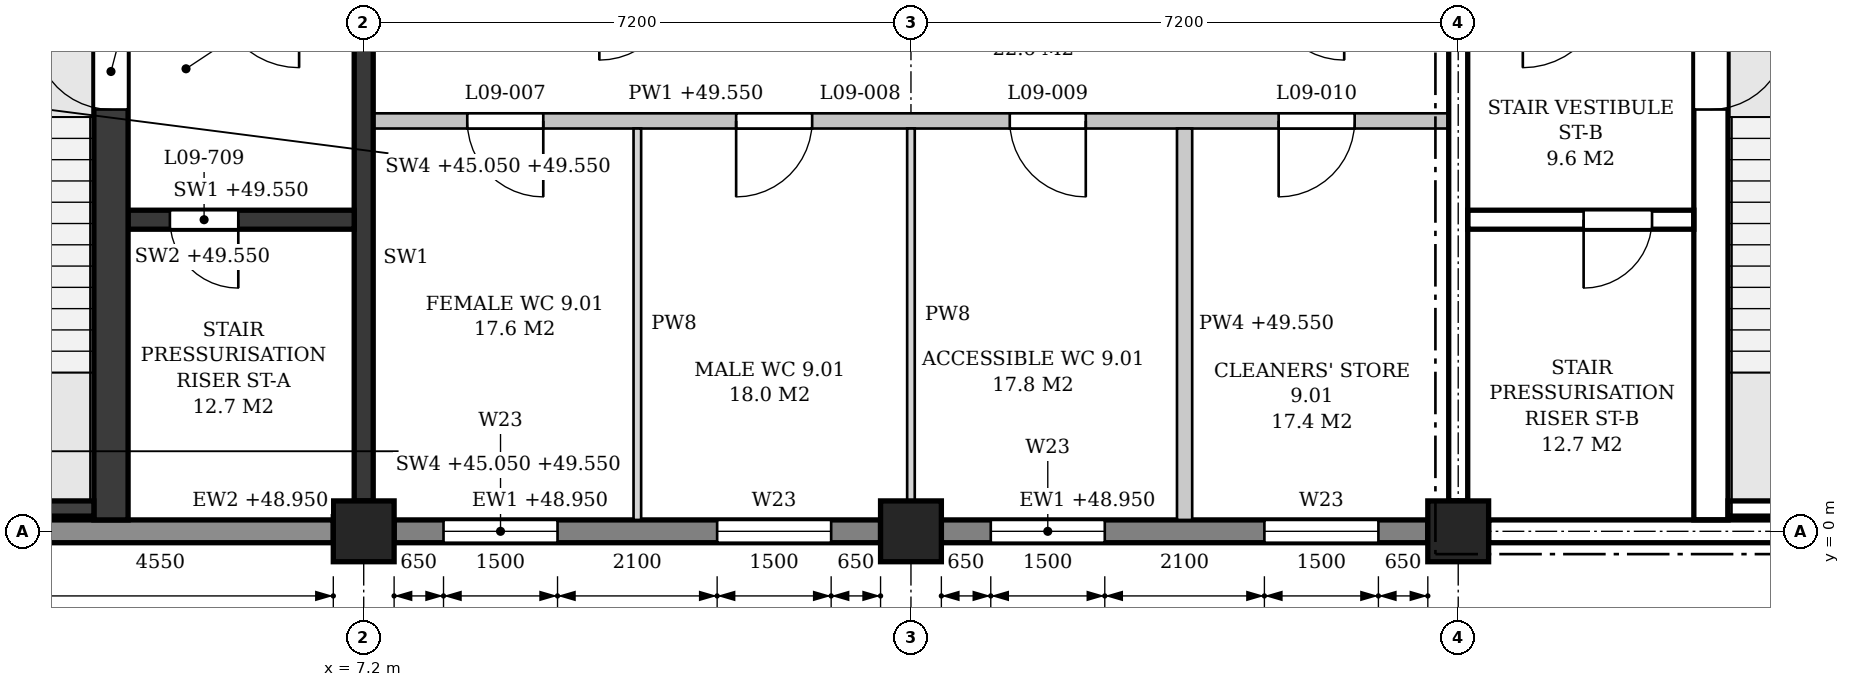
"""IFC4 building model, lengths in metres.
Left out: names, types, materials, properties, quantities, classifications, styles, units other than length and angle.
Written with IfcOpenShell. Run it as: python <this file> out.ifc"""

import sys

from ifc_helpers import new_model, si_unit, direction, frame, frame_2d, origin, origin_2d, place, context, subcontext, project, spatial, polyline, rectangle, outline, extrude, element, fill, save


model = new_model("IFC4")
c1 = context("Model", 3, precision=1e-05, world=origin(), true_north=direction((0.0, 1.0)))
c2 = subcontext(c1, "Body", "Model", "MODEL_VIEW")
j1 = project(units=[si_unit("LENGTHUNIT", "METRE"), si_unit("PLANEANGLEUNIT", "RADIAN")], contexts=[c1])
p1 = place(None, origin())
s1 = spatial("IfcSite", under=j1, at=p1, CompositionType="ELEMENT")
p2 = place(p1, origin())
s2 = spatial("IfcBuilding", under=s1, at=p2, CompositionType="ELEMENT")
p3 = place(p2, frame((0.0, 0.0, 45.3)))
s3 = spatial("IfcBuildingStorey", under=s2, at=p3, CompositionType="ELEMENT", Elevation=45.3)
for number, where, z_axis, x_axis in (
    (1, (7.2, 0.0, 0.0), (0.0, 0.0, 1.0), (1.0, 0.0, 0.0)),
    (2, (14.4, 0.0, 0.0), (0.0, 0.0, 1.0), (1.0, 0.0, 0.0)),
    (3, (21.6, 0.0, 0.0), (0.0, 0.0, 1.0), (1.0, 0.0, 0.0)),
):
    element("IfcColumn", number, at=place(p3, frame(where, z_axis=z_axis, x_axis=x_axis)), inside=s3, PredefinedType="COLUMN", context=c2, shape_type="SweptSolid", body=[
        extrude(rectangle(XDim=0.8, YDim=0.8, at=origin_2d()), origin(), (0.0, 0.0, 1.0), 4.5),
    ])
p4 = place(p3, frame((0.4, 0.0, 0.0), z_axis=(0.0, 0.0, 1.0), x_axis=(1.0, 0.0, 0.0)))
e4 = element("IfcWall", 4, at=p4, inside=s3, PredefinedType="STANDARD", context=c2, shape_type="SweptSolid", body=[
    extrude(rectangle(XDim=6.4, YDim=0.3, at=frame_2d((3.2, 0.0))), origin(), (0.0, 0.0, 1.0), 3.65),
])
p5 = place(p4, frame((0.95, 0.0, 0.9)))
e5 = element("IfcOpeningElement", 5, at=p5, cuts=e4, PredefinedType="OPENING", context=c2, shape_type="SweptSolid", body=[
    extrude(outline(polyline([(0.0, 0.0), (0.9, 0.0), (0.9, 2.25), (0.45, 2.7), (0.0, 2.25), (0.0, 0.0)])), frame((0.0, 0.16, 0.0), z_axis=(0.0, -1.0, 0.0), x_axis=(1.0, 0.0, 0.0)), (0.0, 0.0, 1.0), 0.32),
])
p6 = place(p3, frame((7.6, 0.0, 0.0), z_axis=(0.0, 0.0, 1.0), x_axis=(1.0, 0.0, 0.0)))
e6 = element("IfcWall", 6, at=p6, inside=s3, PredefinedType="STANDARD", context=c2, shape_type="SweptSolid", body=[
    extrude(rectangle(XDim=6.4, YDim=0.3, at=frame_2d((3.2, 0.0))), origin(), (0.0, 0.0, 1.0), 3.65),
])
p7 = place(p6, frame((0.65, 0.0, 0.9)))
e7 = element("IfcOpeningElement", 7, at=p7, cuts=e6, PredefinedType="OPENING", context=c2, shape_type="SweptSolid", body=[
    extrude(outline(polyline([(0.0, 0.0), (1.5, 0.0), (1.5, 1.95), (0.75, 2.7), (0.0, 1.95), (0.0, 0.0)])), frame((0.0, 0.16, 0.0), z_axis=(0.0, -1.0, 0.0), x_axis=(1.0, 0.0, 0.0)), (0.0, 0.0, 1.0), 0.32),
])
p8 = place(p6, frame((4.25, 0.0, 0.9)))
e8 = element("IfcOpeningElement", 8, at=p8, cuts=e6, PredefinedType="OPENING", context=c2, shape_type="SweptSolid", body=[
    extrude(outline(polyline([(0.0, 0.0), (1.5, 0.0), (1.5, 1.95), (0.75, 2.7), (0.0, 1.95), (0.0, 0.0)])), frame((0.0, 0.16, 0.0), z_axis=(0.0, -1.0, 0.0), x_axis=(1.0, 0.0, 0.0)), (0.0, 0.0, 1.0), 0.32),
])
p9 = place(p3, frame((14.8, 0.0, 0.0), z_axis=(0.0, 0.0, 1.0), x_axis=(1.0, 0.0, 0.0)))
e9 = element("IfcWall", 9, at=p9, inside=s3, PredefinedType="STANDARD", context=c2, shape_type="SweptSolid", body=[
    extrude(rectangle(XDim=6.4, YDim=0.3, at=frame_2d((3.2, 0.0))), origin(), (0.0, 0.0, 1.0), 3.65),
])
p10 = place(p9, frame((0.65, 0.0, 0.9)))
e10 = element("IfcOpeningElement", 10, at=p10, cuts=e9, PredefinedType="OPENING", context=c2, shape_type="SweptSolid", body=[
    extrude(outline(polyline([(0.0, 0.0), (1.5, 0.0), (1.5, 1.95), (0.75, 2.7), (0.0, 1.95), (0.0, 0.0)])), frame((0.0, 0.16, 0.0), z_axis=(0.0, -1.0, 0.0), x_axis=(1.0, 0.0, 0.0)), (0.0, 0.0, 1.0), 0.32),
])
p11 = place(p9, frame((4.25, 0.0, 0.9)))
e11 = element("IfcOpeningElement", 11, at=p11, cuts=e9, PredefinedType="OPENING", context=c2, shape_type="SweptSolid", body=[
    extrude(outline(polyline([(0.0, 0.0), (1.5, 0.0), (1.5, 1.95), (0.75, 2.7), (0.0, 1.95), (0.0, 0.0)])), frame((0.0, 0.16, 0.0), z_axis=(0.0, -1.0, 0.0), x_axis=(1.0, 0.0, 0.0)), (0.0, 0.0, 1.0), 0.32),
])
p12 = place(p3, frame((22.0, 0.0, 0.0), z_axis=(0.0, 0.0, 1.0), x_axis=(1.0, 0.0, 0.0)))
e12 = element("IfcWall", 12, at=p12, inside=s3, PredefinedType="STANDARD", context=c2, shape_type="SweptSolid", body=[
    extrude(rectangle(XDim=6.4, YDim=0.3, at=frame_2d((3.2, 0.0))), origin(), (0.0, 0.0, 1.0), 3.65),
])
p13 = place(p12, frame((4.55, 0.0, 0.9)))
e13 = element("IfcOpeningElement", 13, at=p13, cuts=e12, PredefinedType="OPENING", context=c2, shape_type="SweptSolid", body=[
    extrude(outline(polyline([(0.0, 0.0), (0.9, 0.0), (0.9, 2.25), (0.45, 2.7), (0.0, 2.25), (0.0, 0.0)])), frame((0.0, 0.16, 0.0), z_axis=(0.0, -1.0, 0.0), x_axis=(1.0, 0.0, 0.0)), (0.0, 0.0, 1.0), 0.32),
])
p14 = place(p3, frame((7.2, 0.4, 0.0), z_axis=(0.0, 0.0, 1.0), x_axis=(0.0, 1.0, 0.0)))
e14 = element("IfcWall", 14, at=p14, inside=s3, PredefinedType="SHEAR", context=c2, shape_type="SweptSolid", body=[
    extrude(rectangle(XDim=6.4, YDim=0.25, at=frame_2d((3.2, 0.0))), origin(), (0.0, 0.0, 1.0), 3.55),
])
p15 = place(p3, frame((2.25, 0.3, -0.25), z_axis=(0.0, 0.0, 1.0), x_axis=(1.0, 0.0, 0.0)))
e15 = element("IfcWall", 15, at=p15, inside=s3, PredefinedType="SHEAR", context=c2, shape_type="SweptSolid", body=[
    extrude(rectangle(XDim=1.4, YDim=0.2, at=frame_2d((0.7, 0.0))), origin(), (0.0, 0.0, 1.0), 4.5),
])
p16 = place(p3, frame((3.875, 0.15, 0.0), z_axis=(0.0, 0.0, 1.0), x_axis=(0.0, 1.0, 0.0)))
e16 = element("IfcWall", 16, at=p16, inside=s3, PredefinedType="SHEAR", context=c2, shape_type="SweptSolid", body=[
    extrude(rectangle(XDim=6.925, YDim=0.45, at=frame_2d((3.462, 0.0))), origin(), (0.0, 0.0, 1.0), 4.25),
])
p17 = place(p16, frame((5.4, 0.0, 0.0)))
e17 = element("IfcOpeningElement", 17, at=p17, cuts=e16, PredefinedType="OPENING", context=c2, shape_type="SweptSolid", body=[
    extrude(rectangle(XDim=1.0, YDim=2.1, at=frame_2d((0.5, 1.05))), frame((0.0, 0.235, 0.0), z_axis=(0.0, -1.0, 0.0), x_axis=(1.0, 0.0, 0.0)), (0.0, 0.0, 1.0), 0.47),
])
p18 = place(p3, frame((4.1, 4.1, 0.0), z_axis=(0.0, 0.0, 1.0), x_axis=(1.0, 0.0, 0.0)))
e18 = element("IfcWall", 18, at=p18, inside=s3, PredefinedType="SHEAR", context=c2, shape_type="SweptSolid", body=[
    extrude(rectangle(XDim=2.975, YDim=0.25, at=frame_2d((1.487, 0.0))), origin(), (0.0, 0.0, 1.0), 4.25),
])
p19 = place(p18, frame((0.55, 0.0, 0.0)))
e19 = element("IfcOpeningElement", 19, at=p19, cuts=e18, PredefinedType="OPENING", context=c2, shape_type="SweptSolid", body=[
    extrude(rectangle(XDim=0.9, YDim=2.1, at=frame_2d((0.45, 1.05))), frame((0.0, 0.135, 0.0), z_axis=(0.0, -1.0, 0.0), x_axis=(1.0, 0.0, 0.0)), (0.0, 0.0, 1.0), 0.27),
])
p20 = place(p3, frame((21.6, 0.4, 0.0), z_axis=(0.0, 0.0, 1.0), x_axis=(0.0, 1.0, 0.0)))
e20 = element("IfcWall", 20, at=p20, inside=s3, PredefinedType="SHEAR", context=c2, shape_type="SweptSolid", body=[
    extrude(rectangle(XDim=6.4, YDim=0.25, at=frame_2d((3.2, 0.0))), origin(), (0.0, 0.0, 1.0), 3.55),
])
p21 = place(p3, frame((25.15, 0.3, -0.25), z_axis=(0.0, 0.0, 1.0), x_axis=(1.0, 0.0, 0.0)))
e21 = element("IfcWall", 21, at=p21, inside=s3, PredefinedType="SHEAR", context=c2, shape_type="SweptSolid", body=[
    extrude(rectangle(XDim=1.4, YDim=0.2, at=frame_2d((0.7, 0.0))), origin(), (0.0, 0.0, 1.0), 4.5),
])
p22 = place(p3, frame((24.925, 0.15, 0.0), z_axis=(0.0, 0.0, 1.0), x_axis=(0.0, 1.0, 0.0)))
e22 = element("IfcWall", 22, at=p22, inside=s3, PredefinedType="SHEAR", context=c2, shape_type="SweptSolid", body=[
    extrude(rectangle(XDim=6.925, YDim=0.45, at=frame_2d((3.462, 0.0))), origin(), (0.0, 0.0, 1.0), 4.25),
])
p23 = place(p22, frame((5.4, 0.0, 0.0)))
e23 = element("IfcOpeningElement", 23, at=p23, cuts=e22, PredefinedType="OPENING", context=c2, shape_type="SweptSolid", body=[
    extrude(rectangle(XDim=1.0, YDim=2.1, at=frame_2d((0.5, 1.05))), frame((0.0, 0.235, 0.0), z_axis=(0.0, -1.0, 0.0), x_axis=(1.0, 0.0, 0.0)), (0.0, 0.0, 1.0), 0.47),
])
p24 = place(p3, frame((21.725, 4.1, 0.0), z_axis=(0.0, 0.0, 1.0), x_axis=(1.0, 0.0, 0.0)))
e24 = element("IfcWall", 24, at=p24, inside=s3, PredefinedType="SHEAR", context=c2, shape_type="SweptSolid", body=[
    extrude(rectangle(XDim=2.975, YDim=0.25, at=frame_2d((1.487, 0.0))), origin(), (0.0, 0.0, 1.0), 4.25),
])
p25 = place(p24, frame((1.525, 0.0, 0.0)))
e25 = element("IfcOpeningElement", 25, at=p25, cuts=e24, PredefinedType="OPENING", context=c2, shape_type="SweptSolid", body=[
    extrude(rectangle(XDim=0.9, YDim=2.1, at=frame_2d((0.45, 1.05))), frame((0.0, 0.135, 0.0), z_axis=(0.0, -1.0, 0.0), x_axis=(1.0, 0.0, 0.0)), (0.0, 0.0, 1.0), 0.27),
])
p26 = place(p3, frame((7.325, 5.4, 0.0), z_axis=(0.0, 0.0, 1.0), x_axis=(1.0, 0.0, 0.0)))
e26 = element("IfcWall", 26, at=p26, inside=s3, PredefinedType="PARTITIONING", context=c2, shape_type="SweptSolid", body=[
    extrude(outline(polyline([(0.0, 0.0), (14.15, 0.0), (14.15, 3.55), (14.05, 3.55), (14.05, 4.25), (7.3, 4.25), (7.3, 3.55), (6.85, 3.55), (6.85, 4.25), (0.1, 4.25), (0.1, 3.55), (0.0, 3.55), (0.0, 0.0)])), frame((0.0, 0.1, 0.0), z_axis=(0.0, -1.0, 0.0), x_axis=(1.0, 0.0, 0.0)), (0.0, 0.0, 1.0), 0.2),
])
p27 = place(p26, frame((1.238, 0.0, 0.0)))
e27 = element("IfcOpeningElement", 27, at=p27, cuts=e26, PredefinedType="OPENING", context=c2, shape_type="SweptSolid", body=[
    extrude(rectangle(XDim=1.0, YDim=2.1, at=frame_2d((0.5, 1.05))), frame((0.0, 0.11, 0.0), z_axis=(0.0, -1.0, 0.0), x_axis=(1.0, 0.0, 0.0)), (0.0, 0.0, 1.0), 0.22),
])
p28 = place(p26, frame((4.775, 0.0, 0.0)))
e28 = element("IfcOpeningElement", 28, at=p28, cuts=e26, PredefinedType="OPENING", context=c2, shape_type="SweptSolid", body=[
    extrude(rectangle(XDim=1.0, YDim=2.1, at=frame_2d((0.5, 1.05))), frame((0.0, 0.11, 0.0), z_axis=(0.0, -1.0, 0.0), x_axis=(1.0, 0.0, 0.0)), (0.0, 0.0, 1.0), 0.22),
])
p29 = place(p26, frame((8.375, 0.0, 0.0)))
e29 = element("IfcOpeningElement", 29, at=p29, cuts=e26, PredefinedType="OPENING", context=c2, shape_type="SweptSolid", body=[
    extrude(rectangle(XDim=1.0, YDim=2.1, at=frame_2d((0.5, 1.05))), frame((0.0, 0.11, 0.0), z_axis=(0.0, -1.0, 0.0), x_axis=(1.0, 0.0, 0.0)), (0.0, 0.0, 1.0), 0.22),
])
p30 = place(p26, frame((11.913, 0.0, 0.0)))
e30 = element("IfcOpeningElement", 30, at=p30, cuts=e26, PredefinedType="OPENING", context=c2, shape_type="SweptSolid", body=[
    extrude(rectangle(XDim=1.0, YDim=2.1, at=frame_2d((0.5, 1.05))), frame((0.0, 0.11, 0.0), z_axis=(0.0, -1.0, 0.0), x_axis=(1.0, 0.0, 0.0)), (0.0, 0.0, 1.0), 0.22),
])
p31 = place(p3, frame((10.8, 0.15, 0.0), z_axis=(0.0, 0.0, 1.0), x_axis=(0.0, 1.0, 0.0)))
e31 = element("IfcWall", 31, at=p31, inside=s3, PredefinedType="PARTITIONING", context=c2, shape_type="SweptSolid", body=[
    extrude(rectangle(XDim=5.15, YDim=0.1, at=frame_2d((2.575, 0.0))), origin(), (0.0, 0.0, 1.0), 3.55),
])
p32 = place(p3, frame((14.4, 0.4, 0.0), z_axis=(0.0, 0.0, 1.0), x_axis=(0.0, 1.0, 0.0)))
e32 = element("IfcWall", 32, at=p32, inside=s3, PredefinedType="PARTITIONING", context=c2, shape_type="SweptSolid", body=[
    extrude(rectangle(XDim=4.9, YDim=0.1, at=frame_2d((2.45, 0.0))), origin(), (0.0, 0.0, 1.0), 3.55),
])
p33 = place(p3, frame((18.0, 0.15, 0.0), z_axis=(0.0, 0.0, 1.0), x_axis=(0.0, 1.0, 0.0)))
e33 = element("IfcWall", 33, at=p33, inside=s3, PredefinedType="PARTITIONING", context=c2, shape_type="SweptSolid", body=[
    extrude(outline(polyline([(0.0, 0.0), (5.15, 0.0), (5.15, 4.25), (0.05, 4.25), (0.05, 3.65), (0.0, 3.65), (0.0, 0.0)])), frame((0.0, 0.1, 0.0), z_axis=(0.0, -1.0, 0.0), x_axis=(1.0, 0.0, 0.0)), (0.0, 0.0, 1.0), 0.2),
])
p34 = place(p7, origin())
e34 = element("IfcWindow", 34, at=p34, inside=s3, PartitioningType="SINGLE_PANEL", PredefinedType="WINDOW", context=c2, shape_type="SweptSolid", body=[
    extrude(outline(polyline([(0.0, 0.0), (1.5, 0.0), (1.5, 1.95), (0.75, 2.7), (0.0, 1.95), (0.0, 0.0)])), frame((0.0, 0.03, 0.0), z_axis=(0.0, -1.0, 0.0), x_axis=(1.0, 0.0, 0.0)), (0.0, 0.0, 1.0), 0.06),
])
fill(e7, e34)
p35 = place(p8, origin())
e35 = element("IfcWindow", 35, at=p35, inside=s3, PartitioningType="SINGLE_PANEL", PredefinedType="WINDOW", context=c2, shape_type="SweptSolid", body=[
    extrude(outline(polyline([(0.0, 0.0), (1.5, 0.0), (1.5, 1.95), (0.75, 2.7), (0.0, 1.95), (0.0, 0.0)])), frame((0.0, 0.03, 0.0), z_axis=(0.0, -1.0, 0.0), x_axis=(1.0, 0.0, 0.0)), (0.0, 0.0, 1.0), 0.06),
])
fill(e8, e35)
p36 = place(p10, origin())
e36 = element("IfcWindow", 36, at=p36, inside=s3, PartitioningType="SINGLE_PANEL", PredefinedType="WINDOW", context=c2, shape_type="SweptSolid", body=[
    extrude(outline(polyline([(0.0, 0.0), (1.5, 0.0), (1.5, 1.95), (0.75, 2.7), (0.0, 1.95), (0.0, 0.0)])), frame((0.0, 0.03, 0.0), z_axis=(0.0, -1.0, 0.0), x_axis=(1.0, 0.0, 0.0)), (0.0, 0.0, 1.0), 0.06),
])
fill(e10, e36)
p37 = place(p11, origin())
e37 = element("IfcWindow", 37, at=p37, inside=s3, PartitioningType="SINGLE_PANEL", PredefinedType="WINDOW", context=c2, shape_type="SweptSolid", body=[
    extrude(outline(polyline([(0.0, 0.0), (1.5, 0.0), (1.5, 1.95), (0.75, 2.7), (0.0, 1.95), (0.0, 0.0)])), frame((0.0, 0.03, 0.0), z_axis=(0.0, -1.0, 0.0), x_axis=(1.0, 0.0, 0.0)), (0.0, 0.0, 1.0), 0.06),
])
fill(e11, e37)
p38 = place(p17, origin())
e38 = element("IfcDoor", 38, at=p38, inside=s3, OperationType="SINGLE_SWING_RIGHT", PredefinedType="DOOR", context=c2, shape_type="SweptSolid", body=[
    extrude(rectangle(XDim=1.0, YDim=2.1, at=frame_2d((0.5, 1.05))), frame((0.0, 0.025, 0.0), z_axis=(0.0, -1.0, 0.0), x_axis=(1.0, 0.0, 0.0)), (0.0, 0.0, 1.0), 0.05),
])
fill(e17, e38)
p39 = place(p19, frame((0.9, 0.0, 0.0), z_axis=(0.0, 0.0, 1.0), x_axis=(-1.0, 0.0, 0.0)))
e39 = element("IfcDoor", 39, at=p39, inside=s3, OperationType="SINGLE_SWING_LEFT", PredefinedType="DOOR", context=c2, shape_type="SweptSolid", body=[
    extrude(rectangle(XDim=0.9, YDim=2.1, at=frame_2d((0.45, 1.05))), frame((0.0, 0.025, 0.0), z_axis=(0.0, -1.0, 0.0), x_axis=(1.0, 0.0, 0.0)), (0.0, 0.0, 1.0), 0.05),
])
fill(e19, e39)
p40 = place(p23, frame((1.0, 0.0, 0.0), z_axis=(0.0, 0.0, 1.0), x_axis=(-1.0, 0.0, 0.0)))
e40 = element("IfcDoor", 40, at=p40, inside=s3, OperationType="SINGLE_SWING_LEFT", PredefinedType="DOOR", context=c2, shape_type="SweptSolid", body=[
    extrude(rectangle(XDim=1.0, YDim=2.1, at=frame_2d((0.5, 1.05))), frame((0.0, 0.025, 0.0), z_axis=(0.0, -1.0, 0.0), x_axis=(1.0, 0.0, 0.0)), (0.0, 0.0, 1.0), 0.05),
])
fill(e23, e40)
p41 = place(p25, frame((0.9, 0.0, 0.0), z_axis=(0.0, 0.0, 1.0), x_axis=(-1.0, 0.0, 0.0)))
e41 = element("IfcDoor", 41, at=p41, inside=s3, OperationType="SINGLE_SWING_RIGHT", PredefinedType="DOOR", context=c2, shape_type="SweptSolid", body=[
    extrude(rectangle(XDim=0.9, YDim=2.1, at=frame_2d((0.45, 1.05))), frame((0.0, 0.025, 0.0), z_axis=(0.0, -1.0, 0.0), x_axis=(1.0, 0.0, 0.0)), (0.0, 0.0, 1.0), 0.05),
])
fill(e25, e41)
p42 = place(p27, frame((1.0, 0.0, 0.0), z_axis=(0.0, 0.0, 1.0), x_axis=(-1.0, 0.0, 0.0)))
e42 = element("IfcDoor", 42, at=p42, inside=s3, OperationType="SINGLE_SWING_LEFT", PredefinedType="DOOR", context=c2, shape_type="SweptSolid", body=[
    extrude(rectangle(XDim=1.0, YDim=2.1, at=frame_2d((0.5, 1.05))), frame((0.0, 0.025, 0.0), z_axis=(0.0, -1.0, 0.0), x_axis=(1.0, 0.0, 0.0)), (0.0, 0.0, 1.0), 0.05),
])
fill(e27, e42)
p43 = place(p28, frame((1.0, 0.0, 0.0), z_axis=(0.0, 0.0, 1.0), x_axis=(-1.0, 0.0, 0.0)))
e43 = element("IfcDoor", 43, at=p43, inside=s3, OperationType="SINGLE_SWING_RIGHT", PredefinedType="DOOR", context=c2, shape_type="SweptSolid", body=[
    extrude(rectangle(XDim=1.0, YDim=2.1, at=frame_2d((0.5, 1.05))), frame((0.0, 0.025, 0.0), z_axis=(0.0, -1.0, 0.0), x_axis=(1.0, 0.0, 0.0)), (0.0, 0.0, 1.0), 0.05),
])
fill(e28, e43)
p44 = place(p29, frame((1.0, 0.0, 0.0), z_axis=(0.0, 0.0, 1.0), x_axis=(-1.0, 0.0, 0.0)))
e44 = element("IfcDoor", 44, at=p44, inside=s3, OperationType="SINGLE_SWING_LEFT", PredefinedType="DOOR", context=c2, shape_type="SweptSolid", body=[
    extrude(rectangle(XDim=1.0, YDim=2.1, at=frame_2d((0.5, 1.05))), frame((0.0, 0.025, 0.0), z_axis=(0.0, -1.0, 0.0), x_axis=(1.0, 0.0, 0.0)), (0.0, 0.0, 1.0), 0.05),
])
fill(e29, e44)
p45 = place(p30, frame((1.0, 0.0, 0.0), z_axis=(0.0, 0.0, 1.0), x_axis=(-1.0, 0.0, 0.0)))
e45 = element("IfcDoor", 45, at=p45, inside=s3, OperationType="SINGLE_SWING_RIGHT", PredefinedType="DOOR", context=c2, shape_type="SweptSolid", body=[
    extrude(rectangle(XDim=1.0, YDim=2.1, at=frame_2d((0.5, 1.05))), frame((0.0, 0.025, 0.0), z_axis=(0.0, -1.0, 0.0), x_axis=(1.0, 0.0, 0.0)), (0.0, 0.0, 1.0), 0.05),
])
fill(e30, e45)
save(model, sys.argv[1])
